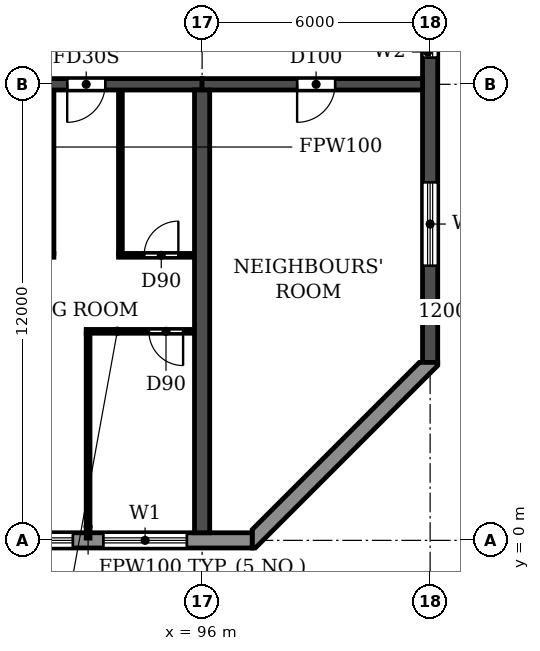
"""IFC4 building model, lengths in metres.
Left out: names, types, materials, properties, quantities, classifications, styles, units other than length and angle.
Written with IfcOpenShell. Run it as: python <this file> out.ifc"""

import sys

from ifc_helpers import new_model, si_unit, direction, frame, frame_2d, origin, place, context, subcontext, project, spatial, polyline, rectangle, outline, extrude, element, fill, save


model = new_model("IFC4")
c1 = context("Model", 3, precision=1e-05, world=origin(), true_north=direction((0.0, 1.0)))
c2 = subcontext(c1, "Body", "Model", "MODEL_VIEW")
j1 = project(units=[si_unit("LENGTHUNIT", "METRE"), si_unit("PLANEANGLEUNIT", "RADIAN")], contexts=[c1])
p1 = place(None, origin())
s1 = spatial("IfcSite", under=j1, at=p1, CompositionType="ELEMENT")
p2 = place(p1, origin())
s2 = spatial("IfcBuilding", under=s1, at=p2, CompositionType="ELEMENT")
p3 = place(p2, frame((0.0, 0.0, 49.8)))
s3 = spatial("IfcBuildingStorey", under=s2, at=p3, CompositionType="ELEMENT", Elevation=49.8)
p4 = place(p3, frame((96.0, 0.2, 0.0), z_axis=(0.0, 0.0, 1.0), x_axis=(0.0, 1.0, 0.0)))
e1 = element("IfcWall", 1, at=p4, inside=s3, PredefinedType="SHEAR", context=c2, shape_type="SweptSolid", body=[
    extrude(rectangle(XDim=11.65, YDim=0.4, at=frame_2d((5.825, 0.0))), origin(), (0.0, 0.0, 1.0), 3.0),
])
p5 = place(p3, frame((102.0, 4.683, 0.0), z_axis=(0.0, 0.0, 1.0), x_axis=(0.0, 1.0, 0.0)))
e2 = element("IfcWall", 2, at=p5, inside=s3, PredefinedType="SHEAR", context=c2, shape_type="SweptSolid", body=[
    extrude(rectangle(XDim=35.434, YDim=0.4, at=frame_2d((17.717, 0.0))), origin(), (0.0, 0.0, 1.0), 3.0),
])
p6 = place(p5, frame((15.917, 0.0, 0.9)))
e3 = element("IfcOpeningElement", 3, at=p6, cuts=e2, PredefinedType="OPENING", context=c2, shape_type="SweptSolid", body=[
    extrude(rectangle(XDim=1.2, YDim=1.5, at=frame_2d((0.6, 0.75))), frame((0.0, 0.21, 0.0), z_axis=(0.0, -1.0, 0.0), x_axis=(1.0, 0.0, 0.0)), (0.0, 0.0, 1.0), 0.42),
])
p7 = place(p5, frame((23.817, 0.0, 0.9)))
e4 = element("IfcOpeningElement", 4, at=p7, cuts=e2, PredefinedType="OPENING", context=c2, shape_type="SweptSolid", body=[
    extrude(rectangle(XDim=1.2, YDim=1.5, at=frame_2d((0.6, 0.75))), frame((0.0, 0.21, 0.0), z_axis=(0.0, -1.0, 0.0), x_axis=(1.0, 0.0, 0.0)), (0.0, 0.0, 1.0), 0.42),
])
p8 = place(p5, frame((8.017, 0.0, 0.9)))
e5 = element("IfcOpeningElement", 5, at=p8, cuts=e2, PredefinedType="OPENING", context=c2, shape_type="SweptSolid", body=[
    extrude(rectangle(XDim=1.2, YDim=1.5, at=frame_2d((0.6, 0.75))), frame((0.0, 0.21, 0.0), z_axis=(0.0, -1.0, 0.0), x_axis=(1.0, 0.0, 0.0)), (0.0, 0.0, 1.0), 0.42),
])
p9 = place(p5, frame((29.493, 0.0, 0.6)))
e6 = element("IfcOpeningElement", 6, at=p9, cuts=e2, PredefinedType="OPENING", context=c2, shape_type="SweptSolid", body=[
    extrude(rectangle(XDim=2.2, YDim=1.8, at=frame_2d((1.1, 0.9))), frame((0.0, 0.21, 0.0), z_axis=(0.0, -1.0, 0.0), x_axis=(1.0, 0.0, 0.0)), (0.0, 0.0, 1.0), 0.42),
])
p10 = place(p5, frame((2.541, 0.0, 0.6)))
e7 = element("IfcOpeningElement", 7, at=p10, cuts=e2, PredefinedType="OPENING", context=c2, shape_type="SweptSolid", body=[
    extrude(rectangle(XDim=2.2, YDim=1.8, at=frame_2d((1.1, 0.9))), frame((0.0, 0.21, 0.0), z_axis=(0.0, -1.0, 0.0), x_axis=(1.0, 0.0, 0.0)), (0.0, 0.0, 1.0), 0.42),
])
p11 = place(p3, frame((90.0, 12.0, 0.0), z_axis=(0.0, 0.0, 1.0), x_axis=(1.0, 0.0, 0.0)))
e8 = element("IfcWall", 8, at=p11, inside=s3, PredefinedType="SHEAR", context=c2, shape_type="SweptSolid", body=[
    extrude(rectangle(XDim=6.0, YDim=0.3, at=frame_2d((3.0, 0.0))), origin(), (0.0, 0.0, 1.0), 2.4),
])
p12 = place(p11, frame((2.45, 0.0, 0.0)))
e9 = element("IfcOpeningElement", 9, at=p12, cuts=e8, PredefinedType="OPENING", context=c2, shape_type="SweptSolid", body=[
    extrude(rectangle(XDim=1.0, YDim=2.1, at=frame_2d((0.5, 1.05))), frame((0.0, 0.16, 0.0), z_axis=(0.0, -1.0, 0.0), x_axis=(1.0, 0.0, 0.0)), (0.0, 0.0, 1.0), 0.32),
])
p13 = place(p3, frame((96.0, 12.0, 0.0), z_axis=(0.0, 0.0, 1.0), x_axis=(1.0, 0.0, 0.0)))
e10 = element("IfcWall", 10, at=p13, inside=s3, PredefinedType="SHEAR", context=c2, shape_type="SweptSolid", body=[
    extrude(rectangle(XDim=5.8, YDim=0.3, at=frame_2d((2.9, 0.0))), origin(), (0.0, 0.0, 1.0), 2.4),
])
p14 = place(p13, frame((2.5, 0.0, 0.0)))
e11 = element("IfcOpeningElement", 11, at=p14, cuts=e10, PredefinedType="OPENING", context=c2, shape_type="SweptSolid", body=[
    extrude(rectangle(XDim=1.0, YDim=2.1, at=frame_2d((0.5, 1.05))), frame((0.0, 0.16, 0.0), z_axis=(0.0, -1.0, 0.0), x_axis=(1.0, 0.0, 0.0)), (0.0, 0.0, 1.0), 0.32),
])
p15 = place(p3, frame((4.683, 0.0, 0.0), z_axis=(0.0, 0.0, 1.0), x_axis=(1.0, 0.0, 0.0)))
e12 = element("IfcWall", 12, at=p15, inside=s3, PredefinedType="STANDARD", context=c2, shape_type="SweptSolid", body=[
    extrude(rectangle(XDim=92.634, YDim=0.4, at=frame_2d((46.317, 0.0))), origin(), (0.0, 0.0, 1.0), 3.0),
])
p16 = place(p15, frame((1.717, 0.0, 0.9)))
e13 = element("IfcOpeningElement", 13, at=p16, cuts=e12, PredefinedType="OPENING", context=c2, shape_type="SweptSolid", body=[
    extrude(rectangle(XDim=2.2, YDim=1.5, at=frame_2d((1.1, 0.75))), frame((0.0, 0.21, 0.0), z_axis=(0.0, -1.0, 0.0), x_axis=(1.0, 0.0, 0.0)), (0.0, 0.0, 1.0), 0.42),
])
p17 = place(p15, frame((4.717, 0.0, 0.9)))
e14 = element("IfcOpeningElement", 14, at=p17, cuts=e12, PredefinedType="OPENING", context=c2, shape_type="SweptSolid", body=[
    extrude(rectangle(XDim=2.2, YDim=1.5, at=frame_2d((1.1, 0.75))), frame((0.0, 0.21, 0.0), z_axis=(0.0, -1.0, 0.0), x_axis=(1.0, 0.0, 0.0)), (0.0, 0.0, 1.0), 0.42),
])
p18 = place(p15, frame((7.717, 0.0, 0.9)))
e15 = element("IfcOpeningElement", 15, at=p18, cuts=e12, PredefinedType="OPENING", context=c2, shape_type="SweptSolid", body=[
    extrude(rectangle(XDim=2.2, YDim=1.5, at=frame_2d((1.1, 0.75))), frame((0.0, 0.21, 0.0), z_axis=(0.0, -1.0, 0.0), x_axis=(1.0, 0.0, 0.0)), (0.0, 0.0, 1.0), 0.42),
])
p19 = place(p15, frame((10.917, 0.0, 0.0)))
e16 = element("IfcOpeningElement", 16, at=p19, cuts=e12, PredefinedType="OPENING", context=c2, shape_type="SweptSolid", body=[
    extrude(rectangle(XDim=1.8, YDim=2.4, at=frame_2d((0.9, 1.2))), frame((0.0, 0.21, 0.0), z_axis=(0.0, -1.0, 0.0), x_axis=(1.0, 0.0, 0.0)), (0.0, 0.0, 1.0), 0.42),
])
p20 = place(p15, frame((13.717, 0.0, 0.9)))
e17 = element("IfcOpeningElement", 17, at=p20, cuts=e12, PredefinedType="OPENING", context=c2, shape_type="SweptSolid", body=[
    extrude(rectangle(XDim=2.2, YDim=1.5, at=frame_2d((1.1, 0.75))), frame((0.0, 0.21, 0.0), z_axis=(0.0, -1.0, 0.0), x_axis=(1.0, 0.0, 0.0)), (0.0, 0.0, 1.0), 0.42),
])
p21 = place(p15, frame((16.717, 0.0, 0.9)))
e18 = element("IfcOpeningElement", 18, at=p21, cuts=e12, PredefinedType="OPENING", context=c2, shape_type="SweptSolid", body=[
    extrude(rectangle(XDim=2.2, YDim=1.5, at=frame_2d((1.1, 0.75))), frame((0.0, 0.21, 0.0), z_axis=(0.0, -1.0, 0.0), x_axis=(1.0, 0.0, 0.0)), (0.0, 0.0, 1.0), 0.42),
])
p22 = place(p15, frame((19.917, 0.0, 0.0)))
e19 = element("IfcOpeningElement", 19, at=p22, cuts=e12, PredefinedType="OPENING", context=c2, shape_type="SweptSolid", body=[
    extrude(rectangle(XDim=1.8, YDim=2.4, at=frame_2d((0.9, 1.2))), frame((0.0, 0.21, 0.0), z_axis=(0.0, -1.0, 0.0), x_axis=(1.0, 0.0, 0.0)), (0.0, 0.0, 1.0), 0.42),
])
p23 = place(p15, frame((22.717, 0.0, 0.9)))
e20 = element("IfcOpeningElement", 20, at=p23, cuts=e12, PredefinedType="OPENING", context=c2, shape_type="SweptSolid", body=[
    extrude(rectangle(XDim=2.2, YDim=1.5, at=frame_2d((1.1, 0.75))), frame((0.0, 0.21, 0.0), z_axis=(0.0, -1.0, 0.0), x_axis=(1.0, 0.0, 0.0)), (0.0, 0.0, 1.0), 0.42),
])
p24 = place(p15, frame((25.717, 0.0, 0.9)))
e21 = element("IfcOpeningElement", 21, at=p24, cuts=e12, PredefinedType="OPENING", context=c2, shape_type="SweptSolid", body=[
    extrude(rectangle(XDim=2.2, YDim=1.5, at=frame_2d((1.1, 0.75))), frame((0.0, 0.21, 0.0), z_axis=(0.0, -1.0, 0.0), x_axis=(1.0, 0.0, 0.0)), (0.0, 0.0, 1.0), 0.42),
])
p25 = place(p15, frame((28.717, 0.0, 0.9)))
e22 = element("IfcOpeningElement", 22, at=p25, cuts=e12, PredefinedType="OPENING", context=c2, shape_type="SweptSolid", body=[
    extrude(rectangle(XDim=2.2, YDim=1.5, at=frame_2d((1.1, 0.75))), frame((0.0, 0.21, 0.0), z_axis=(0.0, -1.0, 0.0), x_axis=(1.0, 0.0, 0.0)), (0.0, 0.0, 1.0), 0.42),
])
p26 = place(p15, frame((31.717, 0.0, 0.9)))
e23 = element("IfcOpeningElement", 23, at=p26, cuts=e12, PredefinedType="OPENING", context=c2, shape_type="SweptSolid", body=[
    extrude(rectangle(XDim=2.2, YDim=1.5, at=frame_2d((1.1, 0.75))), frame((0.0, 0.21, 0.0), z_axis=(0.0, -1.0, 0.0), x_axis=(1.0, 0.0, 0.0)), (0.0, 0.0, 1.0), 0.42),
])
p27 = place(p15, frame((34.917, 0.0, 0.0)))
e24 = element("IfcOpeningElement", 24, at=p27, cuts=e12, PredefinedType="OPENING", context=c2, shape_type="SweptSolid", body=[
    extrude(rectangle(XDim=1.8, YDim=2.4, at=frame_2d((0.9, 1.2))), frame((0.0, 0.21, 0.0), z_axis=(0.0, -1.0, 0.0), x_axis=(1.0, 0.0, 0.0)), (0.0, 0.0, 1.0), 0.42),
])
p28 = place(p15, frame((37.717, 0.0, 0.9)))
e25 = element("IfcOpeningElement", 25, at=p28, cuts=e12, PredefinedType="OPENING", context=c2, shape_type="SweptSolid", body=[
    extrude(rectangle(XDim=2.2, YDim=1.5, at=frame_2d((1.1, 0.75))), frame((0.0, 0.21, 0.0), z_axis=(0.0, -1.0, 0.0), x_axis=(1.0, 0.0, 0.0)), (0.0, 0.0, 1.0), 0.42),
])
p29 = place(p15, frame((40.717, 0.0, 0.9)))
e26 = element("IfcOpeningElement", 26, at=p29, cuts=e12, PredefinedType="OPENING", context=c2, shape_type="SweptSolid", body=[
    extrude(rectangle(XDim=2.2, YDim=1.5, at=frame_2d((1.1, 0.75))), frame((0.0, 0.21, 0.0), z_axis=(0.0, -1.0, 0.0), x_axis=(1.0, 0.0, 0.0)), (0.0, 0.0, 1.0), 0.42),
])
p30 = place(p15, frame((43.717, 0.0, 0.9)))
e27 = element("IfcOpeningElement", 27, at=p30, cuts=e12, PredefinedType="OPENING", context=c2, shape_type="SweptSolid", body=[
    extrude(rectangle(XDim=2.2, YDim=1.5, at=frame_2d((1.1, 0.75))), frame((0.0, 0.21, 0.0), z_axis=(0.0, -1.0, 0.0), x_axis=(1.0, 0.0, 0.0)), (0.0, 0.0, 1.0), 0.42),
])
p31 = place(p15, frame((46.917, 0.0, 0.0)))
e28 = element("IfcOpeningElement", 28, at=p31, cuts=e12, PredefinedType="OPENING", context=c2, shape_type="SweptSolid", body=[
    extrude(rectangle(XDim=1.8, YDim=2.4, at=frame_2d((0.9, 1.2))), frame((0.0, 0.21, 0.0), z_axis=(0.0, -1.0, 0.0), x_axis=(1.0, 0.0, 0.0)), (0.0, 0.0, 1.0), 0.42),
])
p32 = place(p15, frame((49.717, 0.0, 0.9)))
e29 = element("IfcOpeningElement", 29, at=p32, cuts=e12, PredefinedType="OPENING", context=c2, shape_type="SweptSolid", body=[
    extrude(rectangle(XDim=2.2, YDim=1.5, at=frame_2d((1.1, 0.75))), frame((0.0, 0.21, 0.0), z_axis=(0.0, -1.0, 0.0), x_axis=(1.0, 0.0, 0.0)), (0.0, 0.0, 1.0), 0.42),
])
p33 = place(p15, frame((52.717, 0.0, 0.9)))
e30 = element("IfcOpeningElement", 30, at=p33, cuts=e12, PredefinedType="OPENING", context=c2, shape_type="SweptSolid", body=[
    extrude(rectangle(XDim=2.2, YDim=1.5, at=frame_2d((1.1, 0.75))), frame((0.0, 0.21, 0.0), z_axis=(0.0, -1.0, 0.0), x_axis=(1.0, 0.0, 0.0)), (0.0, 0.0, 1.0), 0.42),
])
p34 = place(p15, frame((55.717, 0.0, 0.9)))
e31 = element("IfcOpeningElement", 31, at=p34, cuts=e12, PredefinedType="OPENING", context=c2, shape_type="SweptSolid", body=[
    extrude(rectangle(XDim=2.2, YDim=1.5, at=frame_2d((1.1, 0.75))), frame((0.0, 0.21, 0.0), z_axis=(0.0, -1.0, 0.0), x_axis=(1.0, 0.0, 0.0)), (0.0, 0.0, 1.0), 0.42),
])
p35 = place(p15, frame((58.917, 0.0, 0.0)))
e32 = element("IfcOpeningElement", 32, at=p35, cuts=e12, PredefinedType="OPENING", context=c2, shape_type="SweptSolid", body=[
    extrude(rectangle(XDim=1.8, YDim=2.4, at=frame_2d((0.9, 1.2))), frame((0.0, 0.21, 0.0), z_axis=(0.0, -1.0, 0.0), x_axis=(1.0, 0.0, 0.0)), (0.0, 0.0, 1.0), 0.42),
])
p36 = place(p15, frame((61.717, 0.0, 0.9)))
e33 = element("IfcOpeningElement", 33, at=p36, cuts=e12, PredefinedType="OPENING", context=c2, shape_type="SweptSolid", body=[
    extrude(rectangle(XDim=2.2, YDim=1.5, at=frame_2d((1.1, 0.75))), frame((0.0, 0.21, 0.0), z_axis=(0.0, -1.0, 0.0), x_axis=(1.0, 0.0, 0.0)), (0.0, 0.0, 1.0), 0.42),
])
p37 = place(p15, frame((64.717, 0.0, 0.9)))
e34 = element("IfcOpeningElement", 34, at=p37, cuts=e12, PredefinedType="OPENING", context=c2, shape_type="SweptSolid", body=[
    extrude(rectangle(XDim=2.2, YDim=1.5, at=frame_2d((1.1, 0.75))), frame((0.0, 0.21, 0.0), z_axis=(0.0, -1.0, 0.0), x_axis=(1.0, 0.0, 0.0)), (0.0, 0.0, 1.0), 0.42),
])
p38 = place(p15, frame((67.717, 0.0, 0.9)))
e35 = element("IfcOpeningElement", 35, at=p38, cuts=e12, PredefinedType="OPENING", context=c2, shape_type="SweptSolid", body=[
    extrude(rectangle(XDim=2.2, YDim=1.5, at=frame_2d((1.1, 0.75))), frame((0.0, 0.21, 0.0), z_axis=(0.0, -1.0, 0.0), x_axis=(1.0, 0.0, 0.0)), (0.0, 0.0, 1.0), 0.42),
])
p39 = place(p15, frame((70.917, 0.0, 0.0)))
e36 = element("IfcOpeningElement", 36, at=p39, cuts=e12, PredefinedType="OPENING", context=c2, shape_type="SweptSolid", body=[
    extrude(rectangle(XDim=1.8, YDim=2.4, at=frame_2d((0.9, 1.2))), frame((0.0, 0.21, 0.0), z_axis=(0.0, -1.0, 0.0), x_axis=(1.0, 0.0, 0.0)), (0.0, 0.0, 1.0), 0.42),
])
p40 = place(p15, frame((73.717, 0.0, 0.9)))
e37 = element("IfcOpeningElement", 37, at=p40, cuts=e12, PredefinedType="OPENING", context=c2, shape_type="SweptSolid", body=[
    extrude(rectangle(XDim=2.2, YDim=1.5, at=frame_2d((1.1, 0.75))), frame((0.0, 0.21, 0.0), z_axis=(0.0, -1.0, 0.0), x_axis=(1.0, 0.0, 0.0)), (0.0, 0.0, 1.0), 0.42),
])
p41 = place(p15, frame((76.717, 0.0, 0.9)))
e38 = element("IfcOpeningElement", 38, at=p41, cuts=e12, PredefinedType="OPENING", context=c2, shape_type="SweptSolid", body=[
    extrude(rectangle(XDim=2.2, YDim=1.5, at=frame_2d((1.1, 0.75))), frame((0.0, 0.21, 0.0), z_axis=(0.0, -1.0, 0.0), x_axis=(1.0, 0.0, 0.0)), (0.0, 0.0, 1.0), 0.42),
])
p42 = place(p15, frame((79.717, 0.0, 0.9)))
e39 = element("IfcOpeningElement", 39, at=p42, cuts=e12, PredefinedType="OPENING", context=c2, shape_type="SweptSolid", body=[
    extrude(rectangle(XDim=2.2, YDim=1.5, at=frame_2d((1.1, 0.75))), frame((0.0, 0.21, 0.0), z_axis=(0.0, -1.0, 0.0), x_axis=(1.0, 0.0, 0.0)), (0.0, 0.0, 1.0), 0.42),
])
p43 = place(p15, frame((82.917, 0.0, 0.0)))
e40 = element("IfcOpeningElement", 40, at=p43, cuts=e12, PredefinedType="OPENING", context=c2, shape_type="SweptSolid", body=[
    extrude(rectangle(XDim=1.8, YDim=2.4, at=frame_2d((0.9, 1.2))), frame((0.0, 0.21, 0.0), z_axis=(0.0, -1.0, 0.0), x_axis=(1.0, 0.0, 0.0)), (0.0, 0.0, 1.0), 0.42),
])
p44 = place(p15, frame((85.717, 0.0, 0.9)))
e41 = element("IfcOpeningElement", 41, at=p44, cuts=e12, PredefinedType="OPENING", context=c2, shape_type="SweptSolid", body=[
    extrude(rectangle(XDim=2.2, YDim=1.5, at=frame_2d((1.1, 0.75))), frame((0.0, 0.21, 0.0), z_axis=(0.0, -1.0, 0.0), x_axis=(1.0, 0.0, 0.0)), (0.0, 0.0, 1.0), 0.42),
])
p45 = place(p15, frame((88.717, 0.0, 0.9)))
e42 = element("IfcOpeningElement", 42, at=p45, cuts=e12, PredefinedType="OPENING", context=c2, shape_type="SweptSolid", body=[
    extrude(rectangle(XDim=2.2, YDim=1.5, at=frame_2d((1.1, 0.75))), frame((0.0, 0.21, 0.0), z_axis=(0.0, -1.0, 0.0), x_axis=(1.0, 0.0, 0.0)), (0.0, 0.0, 1.0), 0.42),
])
p46 = place(p3, origin())
e43 = element("IfcWall", 43, at=p46, inside=s3, PredefinedType="STANDARD", context=c2, shape_type="SweptSolid", body=[
    extrude(outline(polyline([(97.317, -0.2), (97.4, -0.2), (102.2, 4.6), (102.2, 4.683), (101.717, 4.683), (97.317, 0.283), (97.317, -0.2)])), origin(), (0.0, 0.0, 1.0), 3.0),
])
p47 = place(p3, frame((92.95, 5.5, 0.0), z_axis=(0.0, 0.0, 1.0), x_axis=(1.0, 0.0, 0.0)))
e44 = element("IfcWall", 44, at=p47, inside=s3, PredefinedType="PARTITIONING", context=c2, shape_type="SweptSolid", body=[
    extrude(rectangle(XDim=2.84, YDim=0.1, at=frame_2d((1.42, 0.0))), origin(), (0.0, 0.0, 1.0), 3.0),
])
p48 = place(p47, frame((1.65, 0.0, 0.0)))
e45 = element("IfcOpeningElement", 45, at=p48, cuts=e44, PredefinedType="OPENING", context=c2, shape_type="SweptSolid", body=[
    extrude(rectangle(XDim=0.9, YDim=2.1, at=frame_2d((0.45, 1.05))), frame((0.0, 0.06, 0.0), z_axis=(0.0, -1.0, 0.0), x_axis=(1.0, 0.0, 0.0)), (0.0, 0.0, 1.0), 0.12),
])
p49 = place(p3, frame((90.21, 7.5, 0.0), z_axis=(0.0, 0.0, 1.0), x_axis=(1.0, 0.0, 0.0)))
e46 = element("IfcWall", 46, at=p49, inside=s3, PredefinedType="PARTITIONING", context=c2, shape_type="SweptSolid", body=[
    extrude(rectangle(XDim=1.89, YDim=0.1, at=frame_2d((0.945, 0.0))), origin(), (0.0, 0.0, 1.0), 3.0),
])
p50 = place(p49, frame((0.415, 0.0, 0.0)))
e47 = element("IfcOpeningElement", 47, at=p50, cuts=e46, PredefinedType="OPENING", context=c2, shape_type="SweptSolid", body=[
    extrude(rectangle(XDim=0.8, YDim=2.1, at=frame_2d((0.4, 1.05))), frame((0.0, 0.06, 0.0), z_axis=(0.0, -1.0, 0.0), x_axis=(1.0, 0.0, 0.0)), (0.0, 0.0, 1.0), 0.12),
])
p51 = place(p3, frame((93.8, 7.5, 0.0), z_axis=(0.0, 0.0, 1.0), x_axis=(1.0, 0.0, 0.0)))
e48 = element("IfcWall", 48, at=p51, inside=s3, PredefinedType="PARTITIONING", context=c2, shape_type="SweptSolid", body=[
    extrude(rectangle(XDim=1.99, YDim=0.1, at=frame_2d((0.995, 0.0))), origin(), (0.0, 0.0, 1.0), 3.0),
])
p52 = place(p51, frame((0.675, 0.0, 0.0)))
e49 = element("IfcOpeningElement", 49, at=p52, cuts=e48, PredefinedType="OPENING", context=c2, shape_type="SweptSolid", body=[
    extrude(rectangle(XDim=0.9, YDim=2.1, at=frame_2d((0.45, 1.05))), frame((0.0, 0.06, 0.0), z_axis=(0.0, -1.0, 0.0), x_axis=(1.0, 0.0, 0.0)), (0.0, 0.0, 1.0), 0.12),
])
p53 = place(p3, frame((92.05, 7.55, 0.0), z_axis=(0.0, 0.0, 1.0), x_axis=(0.0, 1.0, 0.0)))
e50 = element("IfcWall", 50, at=p53, inside=s3, PredefinedType="PARTITIONING", context=c2, shape_type="SweptSolid", body=[
    extrude(rectangle(XDim=4.29, YDim=0.1, at=frame_2d((2.145, 0.0))), origin(), (0.0, 0.0, 1.0), 3.0),
])
p54 = place(p3, frame((93.0, 0.06, 0.0), z_axis=(0.0, 0.0, 1.0), x_axis=(0.0, 1.0, 0.0)))
e51 = element("IfcWall", 51, at=p54, inside=s3, PredefinedType="PARTITIONING", context=c2, shape_type="SweptSolid", body=[
    extrude(rectangle(XDim=5.39, YDim=0.1, at=frame_2d((2.695, 0.0))), origin(), (0.0, 0.0, 1.0), 3.0),
])
p55 = place(p3, frame((93.85, 7.55, 0.0), z_axis=(0.0, 0.0, 1.0), x_axis=(0.0, 1.0, 0.0)))
e52 = element("IfcWall", 52, at=p55, inside=s3, PredefinedType="PARTITIONING", context=c2, shape_type="SweptSolid", body=[
    extrude(rectangle(XDim=4.29, YDim=0.1, at=frame_2d((2.145, 0.0))), origin(), (0.0, 0.0, 1.0), 3.0),
])
p56 = place(p44, origin())
e53 = element("IfcWindow", 53, at=p56, inside=s3, PartitioningType="DOUBLE_PANEL_HORIZONTAL", PredefinedType="WINDOW", context=c2, shape_type="SweptSolid", body=[
    extrude(rectangle(XDim=2.2, YDim=1.5, at=frame_2d((1.1, 0.75))), frame((0.0, 0.03, 0.0), z_axis=(0.0, -1.0, 0.0), x_axis=(1.0, 0.0, 0.0)), (0.0, 0.0, 1.0), 0.06),
])
fill(e41, e53)
p57 = place(p45, origin())
e54 = element("IfcWindow", 54, at=p57, inside=s3, PartitioningType="DOUBLE_PANEL_HORIZONTAL", PredefinedType="WINDOW", context=c2, shape_type="SweptSolid", body=[
    extrude(rectangle(XDim=2.2, YDim=1.5, at=frame_2d((1.1, 0.75))), frame((0.0, 0.03, 0.0), z_axis=(0.0, -1.0, 0.0), x_axis=(1.0, 0.0, 0.0)), (0.0, 0.0, 1.0), 0.06),
])
fill(e42, e54)
p58 = place(p8, origin())
e55 = element("IfcWindow", 55, at=p58, inside=s3, PartitioningType="SINGLE_PANEL", PredefinedType="WINDOW", context=c2, shape_type="SweptSolid", body=[
    extrude(rectangle(XDim=1.2, YDim=1.5, at=frame_2d((0.6, 0.75))), frame((0.0, 0.03, 0.0), z_axis=(0.0, -1.0, 0.0), x_axis=(1.0, 0.0, 0.0)), (0.0, 0.0, 1.0), 0.06),
])
fill(e5, e55)
p59 = place(p10, origin())
e56 = element("IfcWindow", 56, at=p59, inside=s3, PartitioningType="DOUBLE_PANEL_HORIZONTAL", PredefinedType="WINDOW", context=c2, shape_type="SweptSolid", body=[
    extrude(rectangle(XDim=2.2, YDim=1.8, at=frame_2d((1.1, 0.9))), frame((0.0, 0.03, 0.0), z_axis=(0.0, -1.0, 0.0), x_axis=(1.0, 0.0, 0.0)), (0.0, 0.0, 1.0), 0.06),
])
fill(e7, e56)
p60 = place(p12, frame((1.0, 0.0, 0.0), z_axis=(0.0, 0.0, 1.0), x_axis=(-1.0, 0.0, 0.0)))
e57 = element("IfcDoor", 57, at=p60, inside=s3, OperationType="SINGLE_SWING_RIGHT", PredefinedType="DOOR", context=c2, shape_type="SweptSolid", body=[
    extrude(rectangle(XDim=1.0, YDim=2.1, at=frame_2d((0.5, 1.05))), frame((0.0, 0.025, 0.0), z_axis=(0.0, -1.0, 0.0), x_axis=(1.0, 0.0, 0.0)), (0.0, 0.0, 1.0), 0.05),
])
fill(e9, e57)
p61 = place(p52, origin())
e58 = element("IfcDoor", 58, at=p61, inside=s3, OperationType="SINGLE_SWING_RIGHT", PredefinedType="DOOR", context=c2, shape_type="SweptSolid", body=[
    extrude(rectangle(XDim=0.9, YDim=2.1, at=frame_2d((0.45, 1.05))), frame((0.0, 0.025, 0.0), z_axis=(0.0, -1.0, 0.0), x_axis=(1.0, 0.0, 0.0)), (0.0, 0.0, 1.0), 0.05),
])
fill(e49, e58)
p62 = place(p48, frame((0.9, 0.0, 0.0), z_axis=(0.0, 0.0, 1.0), x_axis=(-1.0, 0.0, 0.0)))
e59 = element("IfcDoor", 59, at=p62, inside=s3, OperationType="SINGLE_SWING_LEFT", PredefinedType="DOOR", context=c2, shape_type="SweptSolid", body=[
    extrude(rectangle(XDim=0.9, YDim=2.1, at=frame_2d((0.45, 1.05))), frame((0.0, 0.025, 0.0), z_axis=(0.0, -1.0, 0.0), x_axis=(1.0, 0.0, 0.0)), (0.0, 0.0, 1.0), 0.05),
])
fill(e45, e59)
p63 = place(p14, frame((1.0, 0.0, 0.0), z_axis=(0.0, 0.0, 1.0), x_axis=(-1.0, 0.0, 0.0)))
e60 = element("IfcDoor", 60, at=p63, inside=s3, OperationType="SINGLE_SWING_RIGHT", PredefinedType="DOOR", context=c2, shape_type="SweptSolid", body=[
    extrude(rectangle(XDim=1.0, YDim=2.1, at=frame_2d((0.5, 1.05))), frame((0.0, 0.025, 0.0), z_axis=(0.0, -1.0, 0.0), x_axis=(1.0, 0.0, 0.0)), (0.0, 0.0, 1.0), 0.05),
])
fill(e11, e60)
save(model, sys.argv[1])
